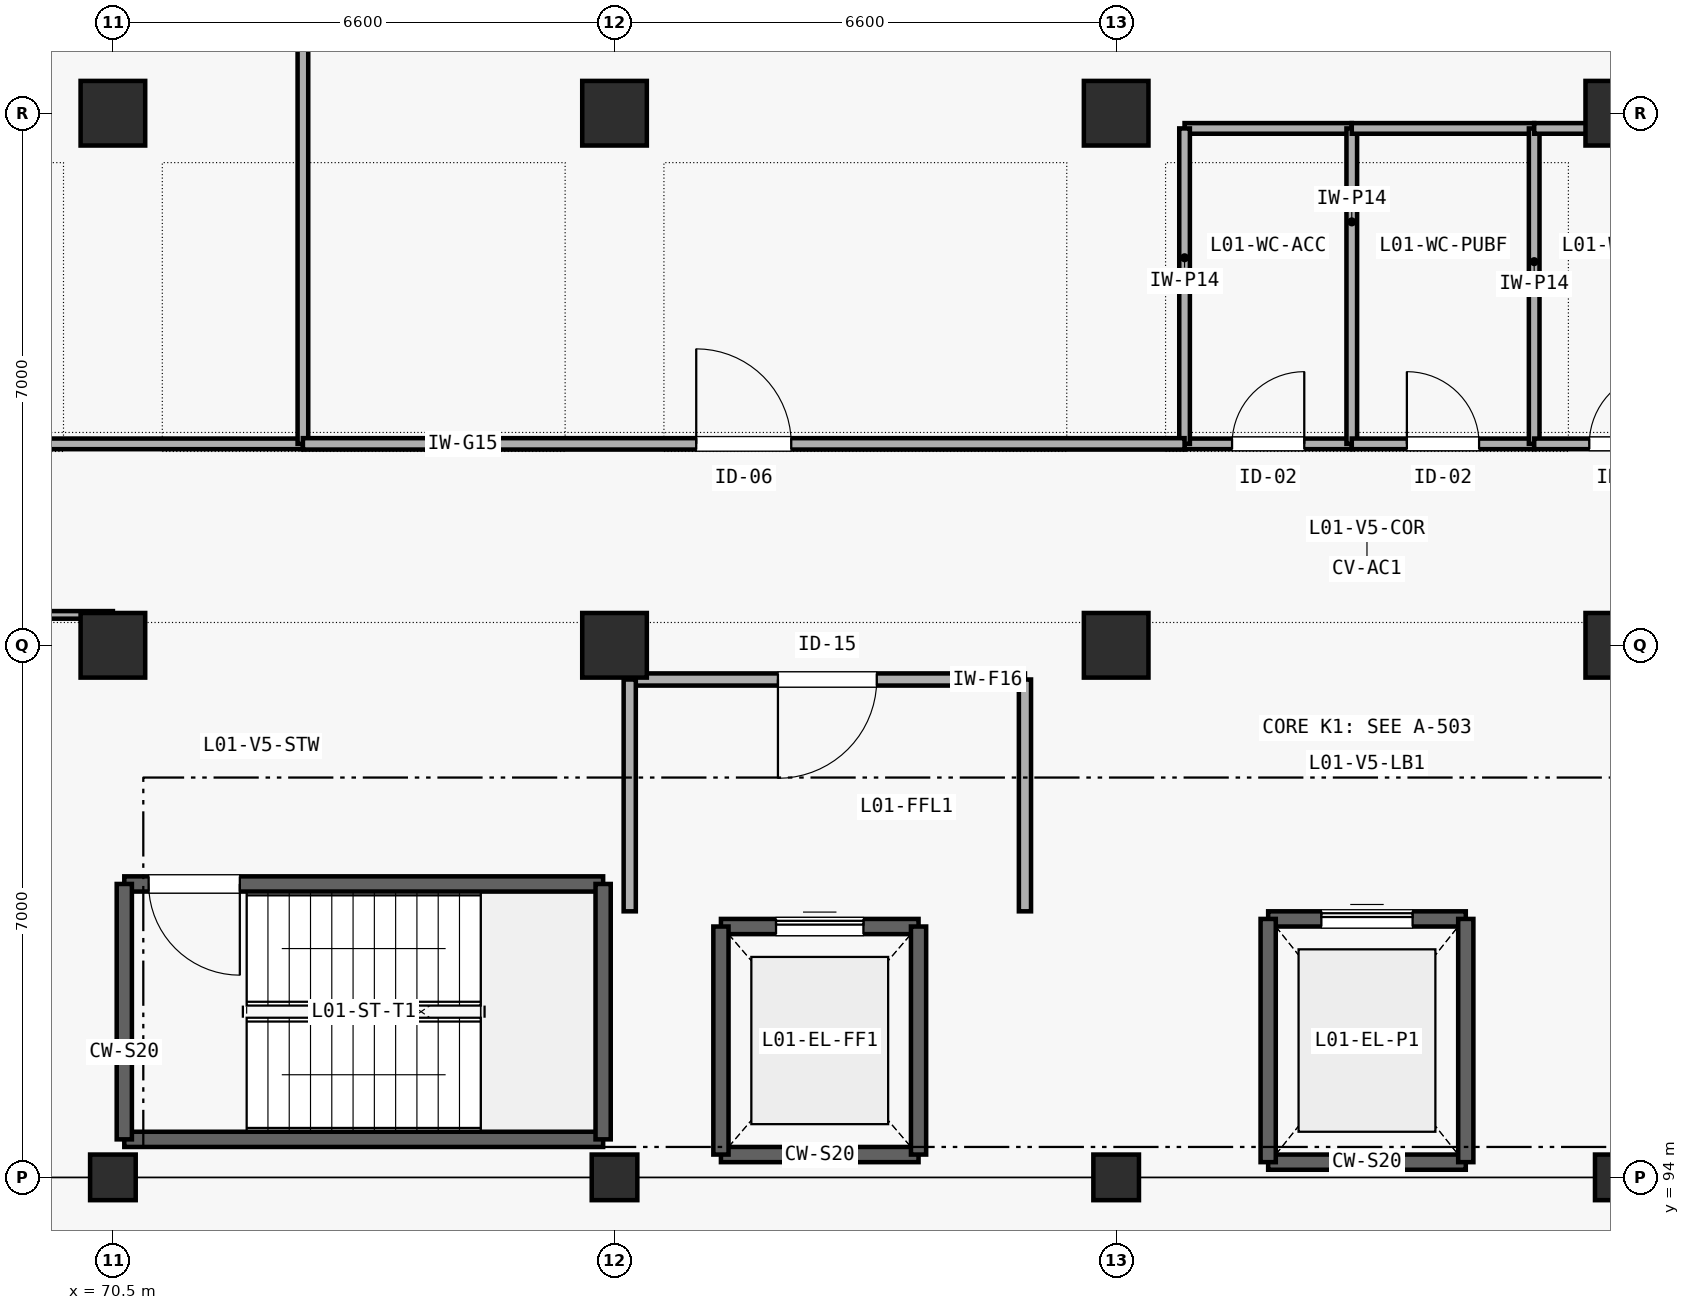
"""IFC4 building model, lengths in metres.
Left out: names, types, materials, properties, quantities, classifications, styles, units other than length and angle.
Written with IfcOpenShell. Run it as: python <this file> out.ifc"""

import sys

from ifc_helpers import new_model, si_unit, direction, frame, frame_2d, origin, origin_2d, place, context, subcontext, project, spatial, rectangle, extrude, element, fill, save


model = new_model("IFC4")
c1 = context("Model", 3, precision=1e-05, world=origin(), true_north=direction((0.0, 1.0)))
c2 = subcontext(c1, "Body", "Model", "MODEL_VIEW")
j1 = project(units=[si_unit("LENGTHUNIT", "METRE"), si_unit("PLANEANGLEUNIT", "RADIAN")], contexts=[c1])
p1 = place(None, origin())
s1 = spatial("IfcSite", under=j1, at=p1, CompositionType="ELEMENT")
p2 = place(p1, origin())
s2 = spatial("IfcBuilding", under=s1, at=p2, CompositionType="ELEMENT")
p3 = place(p2, frame((0.0, 0.0, 4.2)))
s3 = spatial("IfcBuildingStorey", under=s2, at=p3, CompositionType="ELEMENT", Elevation=4.2)
p4 = place(p3, frame((70.5, 94.0, 0.0), z_axis=(0.0, 0.0, 1.0), x_axis=(1.0, 0.0, 0.0)))
e1 = element("IfcColumn", 1, at=p4, inside=s3, PredefinedType="COLUMN", context=c2, shape_type="SweptSolid", body=[
    extrude(rectangle(XDim=0.6, YDim=0.6, at=origin_2d()), origin(), (0.0, 0.0, 1.0), 4.2),
])
for number, where, z_axis, x_axis in (
    (2, (70.5, 101.0, 0.0), (0.0, 0.0, 1.0), (1.0, 0.0, 0.0)),
    (3, (70.5, 108.0, 0.0), (0.0, 0.0, 1.0), (1.0, 0.0, 0.0)),
):
    element("IfcColumn", number, at=place(p3, frame(where, z_axis=z_axis, x_axis=x_axis)), inside=s3, PredefinedType="COLUMN", context=c2, shape_type="SweptSolid", body=[
        extrude(rectangle(XDim=0.85, YDim=0.85, at=origin_2d()), origin(), (0.0, 0.0, 1.0), 4.2),
    ])
p5 = place(p3, frame((77.1, 94.0, 0.0), z_axis=(0.0, 0.0, 1.0), x_axis=(1.0, 0.0, 0.0)))
e4 = element("IfcColumn", 4, at=p5, inside=s3, PredefinedType="COLUMN", context=c2, shape_type="SweptSolid", body=[
    extrude(rectangle(XDim=0.6, YDim=0.6, at=origin_2d()), origin(), (0.0, 0.0, 1.0), 4.2),
])
for number, where, z_axis, x_axis in (
    (5, (77.1, 101.0, 0.0), (0.0, 0.0, 1.0), (1.0, 0.0, 0.0)),
    (6, (77.1, 108.0, 0.0), (0.0, 0.0, 1.0), (1.0, 0.0, 0.0)),
):
    element("IfcColumn", number, at=place(p3, frame(where, z_axis=z_axis, x_axis=x_axis)), inside=s3, PredefinedType="COLUMN", context=c2, shape_type="SweptSolid", body=[
        extrude(rectangle(XDim=0.85, YDim=0.85, at=origin_2d()), origin(), (0.0, 0.0, 1.0), 4.2),
    ])
p6 = place(p3, frame((83.7, 94.0, 0.0), z_axis=(0.0, 0.0, 1.0), x_axis=(1.0, 0.0, 0.0)))
e7 = element("IfcColumn", 7, at=p6, inside=s3, PredefinedType="COLUMN", context=c2, shape_type="SweptSolid", body=[
    extrude(rectangle(XDim=0.6, YDim=0.6, at=origin_2d()), origin(), (0.0, 0.0, 1.0), 4.2),
])
for number, where, z_axis, x_axis in (
    (8, (83.7, 101.0, 0.0), (0.0, 0.0, 1.0), (1.0, 0.0, 0.0)),
    (9, (83.7, 108.0, 0.0), (0.0, 0.0, 1.0), (1.0, 0.0, 0.0)),
):
    element("IfcColumn", number, at=place(p3, frame(where, z_axis=z_axis, x_axis=x_axis)), inside=s3, PredefinedType="COLUMN", context=c2, shape_type="SweptSolid", body=[
        extrude(rectangle(XDim=0.85, YDim=0.85, at=origin_2d()), origin(), (0.0, 0.0, 1.0), 4.2),
    ])
p7 = place(p3, frame((90.3, 94.0, 0.0), z_axis=(0.0, 0.0, 1.0), x_axis=(1.0, 0.0, 0.0)))
e10 = element("IfcColumn", 10, at=p7, inside=s3, PredefinedType="COLUMN", context=c2, shape_type="SweptSolid", body=[
    extrude(rectangle(XDim=0.6, YDim=0.6, at=origin_2d()), origin(), (0.0, 0.0, 1.0), 4.2),
])
for number, where, z_axis, x_axis in (
    (11, (90.3, 101.0, 0.0), (0.0, 0.0, 1.0), (1.0, 0.0, 0.0)),
    (12, (90.3, 108.0, 0.0), (0.0, 0.0, 1.0), (1.0, 0.0, 0.0)),
):
    element("IfcColumn", number, at=place(p3, frame(where, z_axis=z_axis, x_axis=x_axis)), inside=s3, PredefinedType="COLUMN", context=c2, shape_type="SweptSolid", body=[
        extrude(rectangle(XDim=0.85, YDim=0.85, at=origin_2d()), origin(), (0.0, 0.0, 1.0), 4.2),
    ])
p8 = place(p3, frame((70.65, 94.5, 0.0), z_axis=(0.0, 0.0, 1.0), x_axis=(1.0, 0.0, 0.0)))
e13 = element("IfcWall", 13, at=p8, inside=s3, PredefinedType="SHEAR", context=c2, shape_type="SweptSolid", body=[
    extrude(rectangle(XDim=6.3, YDim=0.2, at=frame_2d((3.15, 0.0))), origin(), (0.0, 0.0, 1.0), 4.2),
])
p9 = place(p3, frame((70.65, 97.86, 0.0), z_axis=(0.0, 0.0, 1.0), x_axis=(1.0, 0.0, 0.0)))
e14 = element("IfcWall", 14, at=p9, inside=s3, PredefinedType="SHEAR", context=c2, shape_type="SweptSolid", body=[
    extrude(rectangle(XDim=6.3, YDim=0.2, at=frame_2d((3.15, 0.0))), origin(), (0.0, 0.0, 1.0), 4.2),
])
p10 = place(p9, frame((0.32, 0.0, 0.0)))
e15 = element("IfcOpeningElement", 15, at=p10, cuts=e14, PredefinedType="OPENING", context=c2, shape_type="SweptSolid", body=[
    extrude(rectangle(XDim=1.2, YDim=2.15, at=frame_2d((0.6, 1.075))), frame((0.0, 0.11, 0.0), z_axis=(0.0, -1.0, 0.0), x_axis=(1.0, 0.0, 0.0)), (0.0, 0.0, 1.0), 0.22),
])
for number, where, z_axis, x_axis in (
    (16, (70.65, 94.5, 0.0), (0.0, 0.0, 1.0), (0.0, 1.0, 0.0)),
    (17, (76.95, 94.5, 0.0), (0.0, 0.0, 1.0), (0.0, 1.0, 0.0)),
):
    element("IfcWall", number, at=place(p3, frame(where, z_axis=z_axis, x_axis=x_axis)), inside=s3, PredefinedType="SHEAR", context=c2, shape_type="SweptSolid", body=[
        extrude(rectangle(XDim=3.36, YDim=0.2, at=frame_2d((1.68, 0.0))), origin(), (0.0, 0.0, 1.0), 4.2),
    ])
p11 = place(p3, frame((78.5, 94.3, 0.0), z_axis=(0.0, 0.0, 1.0), x_axis=(1.0, 0.0, 0.0)))
e18 = element("IfcWall", 18, at=p11, inside=s3, PredefinedType="SHEAR", context=c2, shape_type="SweptSolid", body=[
    extrude(rectangle(XDim=2.6, YDim=0.2, at=frame_2d((1.3, 0.0))), origin(), (0.0, 0.0, 1.0), 4.2),
])
p12 = place(p3, frame((78.5, 97.3, 0.0), z_axis=(0.0, 0.0, 1.0), x_axis=(1.0, 0.0, 0.0)))
e19 = element("IfcWall", 19, at=p12, inside=s3, PredefinedType="SHEAR", context=c2, shape_type="SweptSolid", body=[
    extrude(rectangle(XDim=2.6, YDim=0.2, at=frame_2d((1.3, 0.0))), origin(), (0.0, 0.0, 1.0), 4.2),
])
p13 = place(p12, frame((0.725, 0.0, 0.0)))
e20 = element("IfcOpeningElement", 20, at=p13, cuts=e19, PredefinedType="OPENING", context=c2, shape_type="SweptSolid", body=[
    extrude(rectangle(XDim=1.15, YDim=2.2, at=frame_2d((0.575, 1.1))), frame((0.0, 0.11, 0.0), z_axis=(0.0, -1.0, 0.0), x_axis=(1.0, 0.0, 0.0)), (0.0, 0.0, 1.0), 0.22),
])
for number, where, z_axis, x_axis in (
    (21, (78.5, 94.3, 0.0), (0.0, 0.0, 1.0), (0.0, 1.0, 0.0)),
    (22, (81.1, 94.3, 0.0), (0.0, 0.0, 1.0), (0.0, 1.0, 0.0)),
):
    element("IfcWall", number, at=place(p3, frame(where, z_axis=z_axis, x_axis=x_axis)), inside=s3, PredefinedType="SHEAR", context=c2, shape_type="SweptSolid", body=[
        extrude(rectangle(XDim=3.0, YDim=0.2, at=frame_2d((1.5, 0.0))), origin(), (0.0, 0.0, 1.0), 4.2),
    ])
p14 = place(p3, frame((85.7, 94.2, 0.0), z_axis=(0.0, 0.0, 1.0), x_axis=(1.0, 0.0, 0.0)))
e23 = element("IfcWall", 23, at=p14, inside=s3, PredefinedType="SHEAR", context=c2, shape_type="SweptSolid", body=[
    extrude(rectangle(XDim=2.6, YDim=0.2, at=frame_2d((1.3, 0.0))), origin(), (0.0, 0.0, 1.0), 4.2),
])
p15 = place(p3, frame((85.7, 97.4, 0.0), z_axis=(0.0, 0.0, 1.0), x_axis=(1.0, 0.0, 0.0)))
e24 = element("IfcWall", 24, at=p15, inside=s3, PredefinedType="SHEAR", context=c2, shape_type="SweptSolid", body=[
    extrude(rectangle(XDim=2.6, YDim=0.2, at=frame_2d((1.3, 0.0))), origin(), (0.0, 0.0, 1.0), 4.2),
])
p16 = place(p15, frame((0.7, 0.0, 0.0)))
e25 = element("IfcOpeningElement", 25, at=p16, cuts=e24, PredefinedType="OPENING", context=c2, shape_type="SweptSolid", body=[
    extrude(rectangle(XDim=1.2, YDim=2.2, at=frame_2d((0.6, 1.1))), frame((0.0, 0.11, 0.0), z_axis=(0.0, -1.0, 0.0), x_axis=(1.0, 0.0, 0.0)), (0.0, 0.0, 1.0), 0.22),
])
for number, where, z_axis, x_axis in (
    (26, (85.7, 94.2, 0.0), (0.0, 0.0, 1.0), (0.0, 1.0, 0.0)),
    (27, (88.3, 94.2, 0.0), (0.0, 0.0, 1.0), (0.0, 1.0, 0.0)),
):
    element("IfcWall", number, at=place(p3, frame(where, z_axis=z_axis, x_axis=x_axis)), inside=s3, PredefinedType="SHEAR", context=c2, shape_type="SweptSolid", body=[
        extrude(rectangle(XDim=3.2, YDim=0.2, at=frame_2d((1.6, 0.0))), origin(), (0.0, 0.0, 1.0), 4.2),
    ])
p17 = place(p3, frame((77.3, 100.55, 0.0), z_axis=(0.0, 0.0, 1.0), x_axis=(1.0, 0.0, 0.0)))
e28 = element("IfcWall", 28, at=p17, inside=s3, PredefinedType="SOLIDWALL", context=c2, shape_type="SweptSolid", body=[
    extrude(rectangle(XDim=5.2, YDim=0.16, at=frame_2d((2.6, 0.0))), origin(), (0.0, 0.0, 1.0), 3.9),
])
p18 = place(p17, frame((1.95, 0.0, 0.0)))
e29 = element("IfcOpeningElement", 29, at=p18, cuts=e28, PredefinedType="OPENING", context=c2, shape_type="SweptSolid", body=[
    extrude(rectangle(XDim=1.3, YDim=2.15, at=frame_2d((0.65, 1.075))), frame((0.0, 0.09, 0.0), z_axis=(0.0, -1.0, 0.0), x_axis=(1.0, 0.0, 0.0)), (0.0, 0.0, 1.0), 0.18),
])
p19 = place(p3, frame((77.3, 97.5, 0.0), z_axis=(0.0, 0.0, 1.0), x_axis=(0.0, 1.0, 0.0)))
e30 = element("IfcWall", 30, at=p19, inside=s3, PredefinedType="SOLIDWALL", context=c2, shape_type="SweptSolid", body=[
    extrude(rectangle(XDim=3.05, YDim=0.16, at=frame_2d((1.525, 0.0))), origin(), (0.0, 0.0, 1.0), 3.405),
])
p20 = place(p3, frame((82.5, 97.5, 0.0), z_axis=(0.0, 0.0, 1.0), x_axis=(0.0, 1.0, 0.0)))
e31 = element("IfcWall", 31, at=p20, inside=s3, PredefinedType="SOLIDWALL", context=c2, shape_type="SweptSolid", body=[
    extrude(rectangle(XDim=3.05, YDim=0.16, at=frame_2d((1.525, 0.0))), origin(), (0.0, 0.0, 1.0), 3.9),
])
p21 = place(p3, frame((84.6, 103.65, 0.0), z_axis=(0.0, 0.0, 1.0), x_axis=(1.0, 0.0, 0.0)))
e32 = element("IfcWall", 32, at=p21, inside=s3, PredefinedType="PLUMBINGWALL", context=c2, shape_type="SweptSolid", body=[
    extrude(rectangle(XDim=2.2, YDim=0.14, at=frame_2d((1.1, 0.0))), origin(), (0.0, 0.0, 1.0), 3.9),
])
p22 = place(p21, frame((0.625, 0.0, 0.0)))
e33 = element("IfcOpeningElement", 33, at=p22, cuts=e32, PredefinedType="OPENING", context=c2, shape_type="SweptSolid", body=[
    extrude(rectangle(XDim=0.95, YDim=2.1, at=frame_2d((0.475, 1.05))), frame((0.0, 0.08, 0.0), z_axis=(0.0, -1.0, 0.0), x_axis=(1.0, 0.0, 0.0)), (0.0, 0.0, 1.0), 0.16),
])
p23 = place(p3, frame((84.6, 107.8, 0.0), z_axis=(0.0, 0.0, 1.0), x_axis=(1.0, 0.0, 0.0)))
e34 = element("IfcWall", 34, at=p23, inside=s3, PredefinedType="PLUMBINGWALL", context=c2, shape_type="SweptSolid", body=[
    extrude(rectangle(XDim=2.2, YDim=0.14, at=frame_2d((1.1, 0.0))), origin(), (0.0, 0.0, 1.0), 3.285),
])
for number, where, z_axis, x_axis in (
    (35, (84.6, 103.65, 0.0), (0.0, 0.0, 1.0), (0.0, 1.0, 0.0)),
    (36, (86.8, 103.65, 0.0), (0.0, 0.0, 1.0), (0.0, 1.0, 0.0)),
):
    element("IfcWall", number, at=place(p3, frame(where, z_axis=z_axis, x_axis=x_axis)), inside=s3, PredefinedType="PLUMBINGWALL", context=c2, shape_type="SweptSolid", body=[
        extrude(rectangle(XDim=4.15, YDim=0.14, at=frame_2d((2.075, 0.0))), origin(), (0.0, 0.0, 1.0), 3.9),
    ])
p24 = place(p3, frame((86.8, 103.65, 0.0), z_axis=(0.0, 0.0, 1.0), x_axis=(1.0, 0.0, 0.0)))
e37 = element("IfcWall", 37, at=p24, inside=s3, PredefinedType="PLUMBINGWALL", context=c2, shape_type="SweptSolid", body=[
    extrude(rectangle(XDim=2.4, YDim=0.14, at=frame_2d((1.2, 0.0))), origin(), (0.0, 0.0, 1.0), 3.9),
])
p25 = place(p24, frame((0.725, 0.0, 0.0)))
e38 = element("IfcOpeningElement", 38, at=p25, cuts=e37, PredefinedType="OPENING", context=c2, shape_type="SweptSolid", body=[
    extrude(rectangle(XDim=0.95, YDim=2.1, at=frame_2d((0.475, 1.05))), frame((0.0, 0.08, 0.0), z_axis=(0.0, -1.0, 0.0), x_axis=(1.0, 0.0, 0.0)), (0.0, 0.0, 1.0), 0.16),
])
p26 = place(p3, frame((86.8, 107.8, 0.0), z_axis=(0.0, 0.0, 1.0), x_axis=(1.0, 0.0, 0.0)))
e39 = element("IfcWall", 39, at=p26, inside=s3, PredefinedType="PLUMBINGWALL", context=c2, shape_type="SweptSolid", body=[
    extrude(rectangle(XDim=2.4, YDim=0.14, at=frame_2d((1.2, 0.0))), origin(), (0.0, 0.0, 1.0), 3.285),
])
p27 = place(p3, frame((89.2, 103.65, 0.0), z_axis=(0.0, 0.0, 1.0), x_axis=(0.0, 1.0, 0.0)))
e40 = element("IfcWall", 40, at=p27, inside=s3, PredefinedType="PLUMBINGWALL", context=c2, shape_type="SweptSolid", body=[
    extrude(rectangle(XDim=4.15, YDim=0.14, at=frame_2d((2.075, 0.0))), origin(), (0.0, 0.0, 1.0), 3.9),
])
p28 = place(p3, frame((89.2, 103.65, 0.0), z_axis=(0.0, 0.0, 1.0), x_axis=(1.0, 0.0, 0.0)))
e41 = element("IfcWall", 41, at=p28, inside=s3, PredefinedType="PLUMBINGWALL", context=c2, shape_type="SweptSolid", body=[
    extrude(rectangle(XDim=2.4, YDim=0.14, at=frame_2d((1.2, 0.0))), origin(), (0.0, 0.0, 1.0), 3.9),
])
p29 = place(p28, frame((0.725, 0.0, 0.0)))
e42 = element("IfcOpeningElement", 42, at=p29, cuts=e41, PredefinedType="OPENING", context=c2, shape_type="SweptSolid", body=[
    extrude(rectangle(XDim=0.95, YDim=2.1, at=frame_2d((0.475, 1.05))), frame((0.0, 0.08, 0.0), z_axis=(0.0, -1.0, 0.0), x_axis=(1.0, 0.0, 0.0)), (0.0, 0.0, 1.0), 0.16),
])
p30 = place(p3, frame((89.2, 107.8, 0.0), z_axis=(0.0, 0.0, 1.0), x_axis=(1.0, 0.0, 0.0)))
e43 = element("IfcWall", 43, at=p30, inside=s3, PredefinedType="PLUMBINGWALL", context=c2, shape_type="SweptSolid", body=[
    extrude(rectangle(XDim=2.4, YDim=0.14, at=frame_2d((1.2, 0.0))), origin(), (0.0, 0.0, 1.0), 3.285),
])
p31 = place(p3, frame((57.5, 103.65, 0.0), z_axis=(0.0, 0.0, 1.0), x_axis=(1.0, 0.0, 0.0)))
e44 = element("IfcWall", 44, at=p31, inside=s3, PredefinedType="PLUMBINGWALL", context=c2, shape_type="SweptSolid", body=[
    extrude(rectangle(XDim=15.5, YDim=0.14, at=frame_2d((7.75, 0.0))), origin(), (0.0, 0.0, 1.0), 3.9),
])
p32 = place(p31, frame((7.175, 0.0, 0.0)))
e45 = element("IfcOpeningElement", 45, at=p32, cuts=e44, PredefinedType="OPENING", context=c2, shape_type="SweptSolid", body=[
    extrude(rectangle(XDim=1.15, YDim=2.15, at=frame_2d((0.575, 1.075))), frame((0.0, 0.08, 0.0), z_axis=(0.0, -1.0, 0.0), x_axis=(1.0, 0.0, 0.0)), (0.0, 0.0, 1.0), 0.16),
])
p33 = place(p3, frame((73.0, 103.65, 0.0), z_axis=(0.0, 0.0, 1.0), x_axis=(0.0, 1.0, 0.0)))
e46 = element("IfcWall", 46, at=p33, inside=s3, PredefinedType="PLUMBINGWALL", context=c2, shape_type="SweptSolid", body=[
    extrude(rectangle(XDim=11.15, YDim=0.14, at=frame_2d((5.575, 0.0))), origin(), (0.0, 0.0, 1.0), 3.589),
])
p34 = place(p3, frame((73.0, 103.65, 0.0), z_axis=(0.0, 0.0, 1.0), x_axis=(1.0, 0.0, 0.0)))
e47 = element("IfcWall", 47, at=p34, inside=s3, PredefinedType="PARTITIONING", context=c2, shape_type="SweptSolid", body=[
    extrude(rectangle(XDim=11.6, YDim=0.15, at=frame_2d((5.8, 0.0))), origin(), (0.0, 0.0, 1.0), 3.9),
])
p35 = place(p34, frame((5.175, 0.0, 0.0)))
e48 = element("IfcOpeningElement", 48, at=p35, cuts=e47, PredefinedType="OPENING", context=c2, shape_type="SweptSolid", body=[
    extrude(rectangle(XDim=1.25, YDim=2.15, at=frame_2d((0.625, 1.075))), frame((0.0, 0.085, 0.0), z_axis=(0.0, -1.0, 0.0), x_axis=(1.0, 0.0, 0.0)), (0.0, 0.0, 1.0), 0.17),
])
p36 = place(p3, frame((57.5, 101.4, 0.0), z_axis=(0.0, 0.0, 1.0), x_axis=(1.0, 0.0, 0.0)))
e49 = element("IfcWall", 49, at=p36, inside=s3, PredefinedType="PARTITIONING", context=c2, shape_type="SweptSolid", body=[
    extrude(rectangle(XDim=13.0, YDim=0.1, at=frame_2d((6.5, 0.0))), origin(), (0.0, 0.0, 1.0), 3.135),
])
p37 = place(p36, frame((8.125, 0.0, 0.0)))
e50 = element("IfcOpeningElement", 50, at=p37, cuts=e49, PredefinedType="OPENING", context=c2, shape_type="SweptSolid", body=[
    extrude(rectangle(XDim=1.55, YDim=2.2, at=frame_2d((0.775, 1.1))), frame((0.0, 0.06, 0.0), z_axis=(0.0, -1.0, 0.0), x_axis=(1.0, 0.0, 0.0)), (0.0, 0.0, 1.0), 0.12),
])
p38 = place(p10, frame((1.2, 0.0, 0.0), z_axis=(0.0, 0.0, 1.0), x_axis=(-1.0, 0.0, 0.0)))
e51 = element("IfcDoor", 51, at=p38, inside=s3, OperationType="SINGLE_SWING_LEFT", PredefinedType="DOOR", context=c2, shape_type="SweptSolid", body=[
    extrude(rectangle(XDim=1.2, YDim=2.15, at=frame_2d((0.6, 1.075))), frame((0.0, 0.025, 0.0), z_axis=(0.0, -1.0, 0.0), x_axis=(1.0, 0.0, 0.0)), (0.0, 0.0, 1.0), 0.05),
])
fill(e15, e51)
p39 = place(p13, origin())
e52 = element("IfcDoor", 52, at=p39, inside=s3, OperationType="SLIDING_TO_LEFT", PredefinedType="DOOR", context=c2, shape_type="SweptSolid", body=[
    extrude(rectangle(XDim=1.15, YDim=2.2, at=frame_2d((0.575, 1.1))), frame((0.0, 0.025, 0.0), z_axis=(0.0, -1.0, 0.0), x_axis=(1.0, 0.0, 0.0)), (0.0, 0.0, 1.0), 0.05),
])
fill(e20, e52)
p40 = place(p16, origin())
e53 = element("IfcDoor", 53, at=p40, inside=s3, OperationType="SLIDING_TO_LEFT", PredefinedType="DOOR", context=c2, shape_type="SweptSolid", body=[
    extrude(rectangle(XDim=1.2, YDim=2.2, at=frame_2d((0.6, 1.1))), frame((0.0, 0.025, 0.0), z_axis=(0.0, -1.0, 0.0), x_axis=(1.0, 0.0, 0.0)), (0.0, 0.0, 1.0), 0.05),
])
fill(e25, e53)
p41 = place(p18, frame((1.3, 0.0, 0.0), z_axis=(0.0, 0.0, 1.0), x_axis=(-1.0, 0.0, 0.0)))
e54 = element("IfcDoor", 54, at=p41, inside=s3, OperationType="SINGLE_SWING_RIGHT", PredefinedType="DOOR", context=c2, shape_type="SweptSolid", body=[
    extrude(rectangle(XDim=1.3, YDim=2.15, at=frame_2d((0.65, 1.075))), frame((0.0, 0.025, 0.0), z_axis=(0.0, -1.0, 0.0), x_axis=(1.0, 0.0, 0.0)), (0.0, 0.0, 1.0), 0.05),
])
fill(e29, e54)
p42 = place(p22, origin())
e55 = element("IfcDoor", 55, at=p42, inside=s3, OperationType="SINGLE_SWING_RIGHT", PredefinedType="DOOR", context=c2, shape_type="SweptSolid", body=[
    extrude(rectangle(XDim=0.95, YDim=2.1, at=frame_2d((0.475, 1.05))), frame((0.0, 0.025, 0.0), z_axis=(0.0, -1.0, 0.0), x_axis=(1.0, 0.0, 0.0)), (0.0, 0.0, 1.0), 0.05),
])
fill(e33, e55)
p43 = place(p25, origin())
e56 = element("IfcDoor", 56, at=p43, inside=s3, OperationType="SINGLE_SWING_LEFT", PredefinedType="DOOR", context=c2, shape_type="SweptSolid", body=[
    extrude(rectangle(XDim=0.95, YDim=2.1, at=frame_2d((0.475, 1.05))), frame((0.0, 0.025, 0.0), z_axis=(0.0, -1.0, 0.0), x_axis=(1.0, 0.0, 0.0)), (0.0, 0.0, 1.0), 0.05),
])
fill(e38, e56)
p44 = place(p29, origin())
e57 = element("IfcDoor", 57, at=p44, inside=s3, OperationType="SINGLE_SWING_RIGHT", PredefinedType="DOOR", context=c2, shape_type="SweptSolid", body=[
    extrude(rectangle(XDim=0.95, YDim=2.1, at=frame_2d((0.475, 1.05))), frame((0.0, 0.025, 0.0), z_axis=(0.0, -1.0, 0.0), x_axis=(1.0, 0.0, 0.0)), (0.0, 0.0, 1.0), 0.05),
])
fill(e42, e57)
p45 = place(p35, origin())
e58 = element("IfcDoor", 58, at=p45, inside=s3, OperationType="SINGLE_SWING_LEFT", PredefinedType="DOOR", context=c2, shape_type="SweptSolid", body=[
    extrude(rectangle(XDim=1.25, YDim=2.15, at=frame_2d((0.625, 1.075))), frame((0.0, 0.025, 0.0), z_axis=(0.0, -1.0, 0.0), x_axis=(1.0, 0.0, 0.0)), (0.0, 0.0, 1.0), 0.05),
])
fill(e48, e58)
save(model, sys.argv[1])
